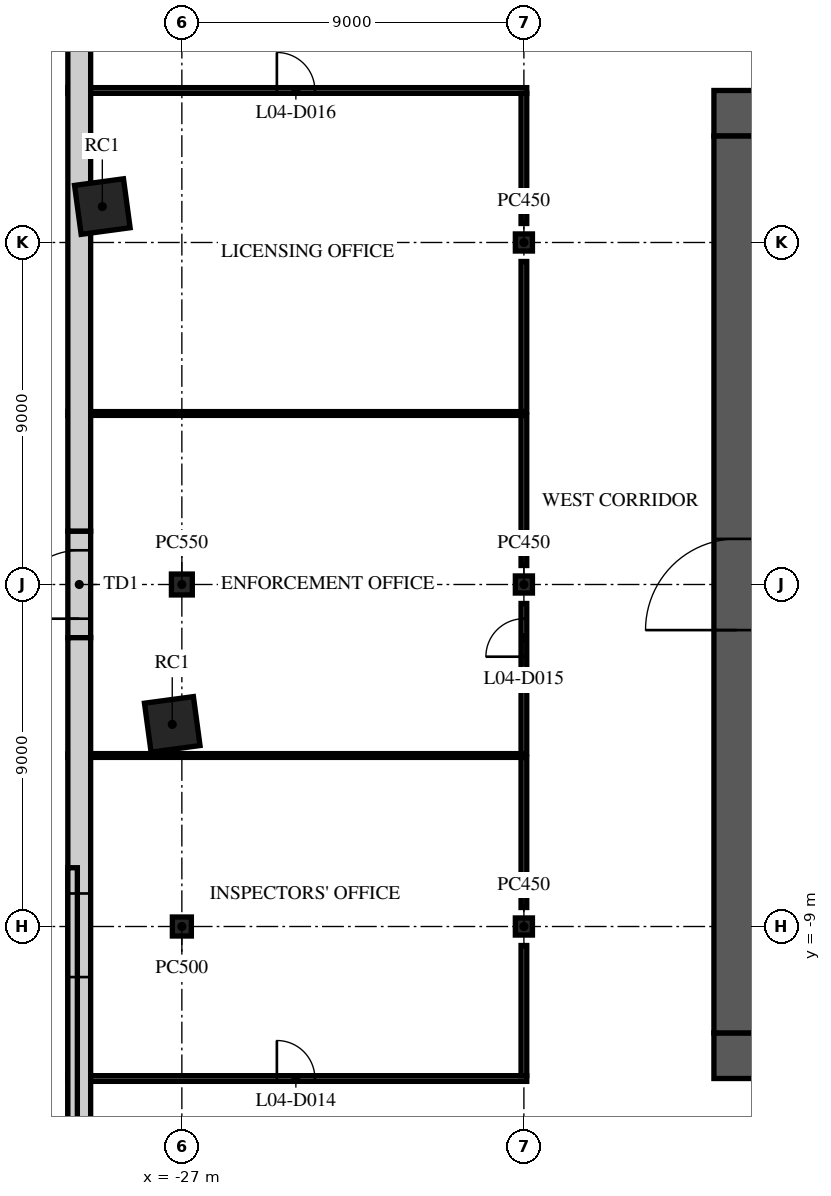
"""IFC4 building model, lengths in metres.
Left out: names, types, materials, properties, quantities, classifications, styles, units other than length and angle.
Written with IfcOpenShell. Run it as: python <this file> out.ifc"""

import sys

from ifc_helpers import new_model, si_unit, direction, frame, frame_2d, origin, origin_2d, place, context, subcontext, project, spatial, rectangle, extrude, element, fill, save


model = new_model("IFC4")
c1 = context("Model", 3, precision=1e-05, world=origin(), true_north=direction((0.0, 1.0)))
c2 = subcontext(c1, "Body", "Model", "MODEL_VIEW")
j1 = project(units=[si_unit("LENGTHUNIT", "METRE"), si_unit("PLANEANGLEUNIT", "RADIAN")], contexts=[c1])
p1 = place(None, origin())
s1 = spatial("IfcSite", under=j1, at=p1, CompositionType="ELEMENT")
p2 = place(p1, origin())
s2 = spatial("IfcBuilding", under=s1, at=p2, CompositionType="ELEMENT")
p3 = place(p2, frame((0.0, 0.0, 18.0)))
s3 = spatial("IfcBuildingStorey", under=s2, at=p3, CompositionType="ELEMENT", Elevation=18.0)
p4 = place(p3, frame((-27.0, -9.0, 0.0), z_axis=(0.0, 0.0, 1.0), x_axis=(1.0, 0.0, 0.0)))
e1 = element("IfcColumn", 1, at=p4, inside=s3, PredefinedType="COLUMN", context=c2, shape_type="SweptSolid", body=[
    extrude(rectangle(XDim=0.5, YDim=0.5, at=origin_2d()), origin(), (0.0, 0.0, 1.0), 4.5),
])
p5 = place(p3, frame((-27.0, 0.0, 0.0), z_axis=(0.0, 0.0, 1.0), x_axis=(1.0, 0.0, 0.0)))
e2 = element("IfcColumn", 2, at=p5, inside=s3, PredefinedType="COLUMN", context=c2, shape_type="SweptSolid", body=[
    extrude(rectangle(XDim=0.55, YDim=0.55, at=origin_2d()), origin(), (0.0, 0.0, 1.0), 4.5),
])
for number, where, z_axis, x_axis in (
    (3, (-18.0, -9.0, 0.0), (0.0, 0.0, 1.0), (1.0, 0.0, 0.0)),
    (4, (-18.0, 0.0, 0.0), (0.0, 0.0, 1.0), (1.0, 0.0, 0.0)),
    (5, (-18.0, 9.0, 0.0), (0.0, 0.0, 1.0), (1.0, 0.0, 0.0)),
):
    element("IfcColumn", number, at=place(p3, frame(where, z_axis=z_axis, x_axis=x_axis)), inside=s3, PredefinedType="COLUMN", context=c2, shape_type="SweptSolid", body=[
        extrude(rectangle(XDim=0.45, YDim=0.45, at=origin_2d()), origin(), (0.0, 0.0, 1.0), 4.5),
    ])
for number, where, z_axis, x_axis in (
    (6, (-29.093, 9.945, 0.0), (0.0, 0.0, 1.0), (0.991, 0.134, 0.0)),
    (7, (-27.253, -3.681, 0.0), (0.0, 0.0, 1.0), (0.991, 0.134, 0.0)),
):
    element("IfcColumn", number, at=place(p3, frame(where, z_axis=z_axis, x_axis=x_axis)), inside=s3, PredefinedType="COLUMN", context=c2, shape_type="SweptSolid", body=[
        extrude(rectangle(XDim=1.3, YDim=1.3, at=origin_2d()), origin(), (0.0, 0.0, 1.0), 4.5),
    ])
p6 = place(p3, frame((-13.0, 12.4, 0.0), z_axis=(0.0, 0.0, 1.0), x_axis=(1.0, 0.0, 0.0)))
e8 = element("IfcWall", 8, at=p6, inside=s3, PredefinedType="SHEAR", context=c2, shape_type="SweptSolid", body=[
    extrude(rectangle(XDim=26.0, YDim=1.2, at=frame_2d((13.0, 0.0))), origin(), (0.0, 0.0, 1.0), 4.05),
])
p7 = place(p6, frame((11.8, 0.0, 0.0)))
e9 = element("IfcOpeningElement", 9, at=p7, cuts=e8, PredefinedType="OPENING", context=c2, shape_type="SweptSolid", body=[
    extrude(rectangle(XDim=2.4, YDim=2.4, at=frame_2d((1.2, 1.2))), frame((0.0, 0.61, 0.0), z_axis=(0.0, -1.0, 0.0), x_axis=(1.0, 0.0, 0.0)), (0.0, 0.0, 1.0), 1.22),
])
p8 = place(p6, frame((22.625, 0.0, 0.0)))
e10 = element("IfcOpeningElement", 10, at=p8, cuts=e8, PredefinedType="OPENING", context=c2, shape_type="SweptSolid", body=[
    extrude(rectangle(XDim=1.2, YDim=2.1, at=frame_2d((0.6, 1.05))), frame((0.0, 0.61, 0.0), z_axis=(0.0, -1.0, 0.0), x_axis=(1.0, 0.0, 0.0)), (0.0, 0.0, 1.0), 1.22),
])
p9 = place(p6, frame((1.6, 0.0, 0.0)))
e11 = element("IfcOpeningElement", 11, at=p9, cuts=e8, PredefinedType="OPENING", context=c2, shape_type="SweptSolid", body=[
    extrude(rectangle(XDim=1.0, YDim=2.1, at=frame_2d((0.5, 1.05))), frame((0.0, 0.61, 0.0), z_axis=(0.0, -1.0, 0.0), x_axis=(1.0, 0.0, 0.0)), (0.0, 0.0, 1.0), 1.22),
])
p10 = place(p3, frame((-13.0, -12.4, 0.0), z_axis=(0.0, 0.0, 1.0), x_axis=(1.0, 0.0, 0.0)))
e12 = element("IfcWall", 12, at=p10, inside=s3, PredefinedType="SHEAR", context=c2, shape_type="SweptSolid", body=[
    extrude(rectangle(XDim=26.0, YDim=1.2, at=frame_2d((13.0, 0.0))), origin(), (0.0, 0.0, 1.0), 4.05),
])
p11 = place(p10, frame((7.9, 0.0, 0.0)))
e13 = element("IfcOpeningElement", 13, at=p11, cuts=e12, PredefinedType="OPENING", context=c2, shape_type="SweptSolid", body=[
    extrude(rectangle(XDim=2.0, YDim=2.1, at=frame_2d((1.0, 1.05))), frame((0.0, 0.61, 0.0), z_axis=(0.0, -1.0, 0.0), x_axis=(1.0, 0.0, 0.0)), (0.0, 0.0, 1.0), 1.22),
])
p12 = place(p10, frame((18.025, 0.0, 0.0)))
e14 = element("IfcOpeningElement", 14, at=p12, cuts=e12, PredefinedType="OPENING", context=c2, shape_type="SweptSolid", body=[
    extrude(rectangle(XDim=1.2, YDim=2.1, at=frame_2d((0.6, 1.05))), frame((0.0, 0.61, 0.0), z_axis=(0.0, -1.0, 0.0), x_axis=(1.0, 0.0, 0.0)), (0.0, 0.0, 1.0), 1.22),
])
p13 = place(p10, frame((2.175, 0.0, 0.0)))
e15 = element("IfcOpeningElement", 15, at=p13, cuts=e12, PredefinedType="OPENING", context=c2, shape_type="SweptSolid", body=[
    extrude(rectangle(XDim=1.2, YDim=2.1, at=frame_2d((0.6, 1.05))), frame((0.0, 0.61, 0.0), z_axis=(0.0, -1.0, 0.0), x_axis=(1.0, 0.0, 0.0)), (0.0, 0.0, 1.0), 1.22),
])
p14 = place(p10, frame((22.625, 0.0, 0.0)))
e16 = element("IfcOpeningElement", 16, at=p14, cuts=e12, PredefinedType="OPENING", context=c2, shape_type="SweptSolid", body=[
    extrude(rectangle(XDim=1.2, YDim=2.1, at=frame_2d((0.6, 1.05))), frame((0.0, 0.61, 0.0), z_axis=(0.0, -1.0, 0.0), x_axis=(1.0, 0.0, 0.0)), (0.0, 0.0, 1.0), 1.22),
])
p15 = place(p3, frame((-12.4, -11.8, 0.0), z_axis=(0.0, 0.0, 1.0), x_axis=(0.0, 1.0, 0.0)))
e17 = element("IfcWall", 17, at=p15, inside=s3, PredefinedType="SHEAR", context=c2, shape_type="SweptSolid", body=[
    extrude(rectangle(XDim=23.6, YDim=1.2, at=frame_2d((11.8, 0.0))), origin(), (0.0, 0.0, 1.0), 4.05),
])
p16 = place(p15, frame((10.6, 0.0, 0.0)))
e18 = element("IfcOpeningElement", 18, at=p16, cuts=e17, PredefinedType="OPENING", context=c2, shape_type="SweptSolid", body=[
    extrude(rectangle(XDim=2.4, YDim=2.4, at=frame_2d((1.2, 1.2))), frame((0.0, 0.61, 0.0), z_axis=(0.0, -1.0, 0.0), x_axis=(1.0, 0.0, 0.0)), (0.0, 0.0, 1.0), 1.22),
])
p17 = place(p3, frame((-30.0, -13.0, 0.0), z_axis=(0.0, 0.0, 1.0), x_axis=(1.0, 0.0, 0.0)))
e19 = element("IfcWall", 19, at=p17, inside=s3, PredefinedType="PARTITIONING", context=c2, shape_type="SweptSolid", body=[
    extrude(rectangle(XDim=12.075, YDim=0.15, at=frame_2d((6.038, 0.0))), origin(), (0.0, 0.0, 1.0), 3.23),
])
p18 = place(p17, frame((5.5, 0.0, 0.0)))
e20 = element("IfcOpeningElement", 20, at=p18, cuts=e19, PredefinedType="OPENING", context=c2, shape_type="SweptSolid", body=[
    extrude(rectangle(XDim=1.0, YDim=2.1, at=frame_2d((0.5, 1.05))), frame((0.0, 0.085, 0.0), z_axis=(0.0, -1.0, 0.0), x_axis=(1.0, 0.0, 0.0)), (0.0, 0.0, 1.0), 0.17),
])
for number, where, z_axis, x_axis in (
    (21, (-30.0, -4.5, 0.0), (0.0, 0.0, 1.0), (1.0, 0.0, 0.0)),
    (22, (-30.0, 4.5, 0.0), (0.0, 0.0, 1.0), (1.0, 0.0, 0.0)),
):
    element("IfcWall", number, at=place(p3, frame(where, z_axis=z_axis, x_axis=x_axis)), inside=s3, PredefinedType="PARTITIONING", context=c2, shape_type="SweptSolid", body=[
        extrude(rectangle(XDim=11.925, YDim=0.1, at=frame_2d((5.962, 0.0))), origin(), (0.0, 0.0, 1.0), 3.23),
    ])
p19 = place(p3, frame((-30.0, 13.0, 0.0), z_axis=(0.0, 0.0, 1.0), x_axis=(1.0, 0.0, 0.0)))
e23 = element("IfcWall", 23, at=p19, inside=s3, PredefinedType="PARTITIONING", context=c2, shape_type="SweptSolid", body=[
    extrude(rectangle(XDim=12.075, YDim=0.15, at=frame_2d((6.038, 0.0))), origin(), (0.0, 0.0, 1.0), 3.23),
])
p20 = place(p19, frame((5.5, 0.0, 0.0)))
e24 = element("IfcOpeningElement", 24, at=p20, cuts=e23, PredefinedType="OPENING", context=c2, shape_type="SweptSolid", body=[
    extrude(rectangle(XDim=1.0, YDim=2.1, at=frame_2d((0.5, 1.05))), frame((0.0, 0.085, 0.0), z_axis=(0.0, -1.0, 0.0), x_axis=(1.0, 0.0, 0.0)), (0.0, 0.0, 1.0), 0.17),
])
p21 = place(p3, frame((-18.0, -12.925, 0.0), z_axis=(0.0, 0.0, 1.0), x_axis=(0.0, 1.0, 0.0)))
e25 = element("IfcWall", 25, at=p21, inside=s3, PredefinedType="PARTITIONING", context=c2, shape_type="SweptSolid", body=[
    extrude(rectangle(XDim=3.425, YDim=0.15, at=frame_2d((1.712, 0.0))), origin(), (0.0, 0.0, 1.0), 3.53),
])
p22 = place(p3, frame((-18.0, -8.5, 0.0), z_axis=(0.0, 0.0, 1.0), x_axis=(0.0, 1.0, 0.0)))
e26 = element("IfcWall", 26, at=p22, inside=s3, PredefinedType="PARTITIONING", context=c2, shape_type="SweptSolid", body=[
    extrude(rectangle(XDim=3.95, YDim=0.15, at=frame_2d((1.975, 0.0))), origin(), (0.0, 0.0, 1.0), 4.05),
])
p23 = place(p3, frame((-18.0, -4.45, 0.0), z_axis=(0.0, 0.0, 1.0), x_axis=(0.0, 1.0, 0.0)))
e27 = element("IfcWall", 27, at=p23, inside=s3, PredefinedType="PARTITIONING", context=c2, shape_type="SweptSolid", body=[
    extrude(rectangle(XDim=3.95, YDim=0.15, at=frame_2d((1.975, 0.0))), origin(), (0.0, 0.0, 1.0), 3.53),
])
p24 = place(p23, frame((2.55, 0.0, 0.0)))
e28 = element("IfcOpeningElement", 28, at=p24, cuts=e27, PredefinedType="OPENING", context=c2, shape_type="SweptSolid", body=[
    extrude(rectangle(XDim=1.0, YDim=2.1, at=frame_2d((0.5, 1.05))), frame((0.0, 0.085, 0.0), z_axis=(0.0, -1.0, 0.0), x_axis=(1.0, 0.0, 0.0)), (0.0, 0.0, 1.0), 0.17),
])
p25 = place(p3, frame((-18.0, 0.5, 0.0), z_axis=(0.0, 0.0, 1.0), x_axis=(0.0, 1.0, 0.0)))
e29 = element("IfcWall", 29, at=p25, inside=s3, PredefinedType="PARTITIONING", context=c2, shape_type="SweptSolid", body=[
    extrude(rectangle(XDim=3.95, YDim=0.15, at=frame_2d((1.975, 0.0))), origin(), (0.0, 0.0, 1.0), 3.53),
])
p26 = place(p3, frame((-18.0, 4.55, 0.0), z_axis=(0.0, 0.0, 1.0), x_axis=(0.0, 1.0, 0.0)))
e30 = element("IfcWall", 30, at=p26, inside=s3, PredefinedType="PARTITIONING", context=c2, shape_type="SweptSolid", body=[
    extrude(rectangle(XDim=3.95, YDim=0.15, at=frame_2d((1.975, 0.0))), origin(), (0.0, 0.0, 1.0), 4.05),
])
p27 = place(p3, frame((-18.0, 9.5, 0.0), z_axis=(0.0, 0.0, 1.0), x_axis=(0.0, 1.0, 0.0)))
e31 = element("IfcWall", 31, at=p27, inside=s3, PredefinedType="PARTITIONING", context=c2, shape_type="SweptSolid", body=[
    extrude(rectangle(XDim=3.425, YDim=0.15, at=frame_2d((1.712, 0.0))), origin(), (0.0, 0.0, 1.0), 3.53),
])
p28 = place(p3, frame((-29.7, 29.4, 0.0), z_axis=(0.0, 0.0, 1.0), x_axis=(0.0, -1.0, 0.0)))
e32 = element("IfcWall", 32, at=p28, inside=s3, PredefinedType="STANDARD", context=c2, shape_type="SweptSolid", body=[
    extrude(rectangle(XDim=28.0, YDim=0.6, at=frame_2d((14.0, 0.0))), origin(), (0.0, 0.0, 1.0), 4.05),
])
p29 = place(p28, frame((0.908, 0.0, 0.9)))
e33 = element("IfcOpeningElement", 33, at=p29, cuts=e32, PredefinedType="OPENING", context=c2, shape_type="SweptSolid", body=[
    extrude(rectangle(XDim=2.2, YDim=3.0, at=frame_2d((1.1, 1.5))), frame((0.0, 0.31, 0.0), z_axis=(0.0, -1.0, 0.0), x_axis=(1.0, 0.0, 0.0)), (0.0, 0.0, 1.0), 0.62),
])
p30 = place(p28, frame((5.223, 0.0, 0.9)))
e34 = element("IfcOpeningElement", 34, at=p30, cuts=e32, PredefinedType="OPENING", context=c2, shape_type="SweptSolid", body=[
    extrude(rectangle(XDim=2.2, YDim=3.0, at=frame_2d((1.1, 1.5))), frame((0.0, 0.31, 0.0), z_axis=(0.0, -1.0, 0.0), x_axis=(1.0, 0.0, 0.0)), (0.0, 0.0, 1.0), 0.62),
])
p31 = place(p3, frame((-29.7, -1.4, 0.0), z_axis=(0.0, 0.0, 1.0), x_axis=(0.0, 1.0, 0.0)))
e35 = element("IfcWall", 35, at=p31, inside=s3, PredefinedType="STANDARD", context=c2, shape_type="SweptSolid", body=[
    extrude(rectangle(XDim=2.8, YDim=0.6, at=frame_2d((1.4, 0.0))), origin(), (0.0, 0.0, 1.0), 4.05),
])
p32 = place(p31, frame((0.5, 0.0, 0.0)))
e36 = element("IfcOpeningElement", 36, at=p32, cuts=e35, PredefinedType="OPENING", context=c2, shape_type="SweptSolid", body=[
    extrude(rectangle(XDim=1.8, YDim=2.4, at=frame_2d((0.9, 1.2))), frame((0.0, 0.31, 0.0), z_axis=(0.0, -1.0, 0.0), x_axis=(1.0, 0.0, 0.0)), (0.0, 0.0, 1.0), 0.62),
])
p33 = place(p3, frame((-29.7, -1.4, 0.0), z_axis=(0.0, 0.0, 1.0), x_axis=(0.0, -1.0, 0.0)))
e37 = element("IfcWall", 37, at=p33, inside=s3, PredefinedType="STANDARD", context=c2, shape_type="SweptSolid", body=[
    extrude(rectangle(XDim=28.6, YDim=0.6, at=frame_2d((14.3, 0.0))), origin(), (0.0, 0.0, 1.0), 4.05),
])
p34 = place(p33, frame((6.731, 0.0, 0.9)))
e38 = element("IfcOpeningElement", 38, at=p34, cuts=e37, PredefinedType="OPENING", context=c2, shape_type="SweptSolid", body=[
    extrude(rectangle(XDim=2.2, YDim=3.0, at=frame_2d((1.1, 1.5))), frame((0.0, 0.31, 0.0), z_axis=(0.0, -1.0, 0.0), x_axis=(1.0, 0.0, 0.0)), (0.0, 0.0, 1.0), 0.62),
])
p35 = place(p33, frame((20.577, 0.0, 0.9)))
e39 = element("IfcOpeningElement", 39, at=p35, cuts=e37, PredefinedType="OPENING", context=c2, shape_type="SweptSolid", body=[
    extrude(rectangle(XDim=2.2, YDim=3.0, at=frame_2d((1.1, 1.5))), frame((0.0, 0.31, 0.0), z_axis=(0.0, -1.0, 0.0), x_axis=(1.0, 0.0, 0.0)), (0.0, 0.0, 1.0), 0.62),
])
p36 = place(p33, frame((25.192, 0.0, 0.9)))
e40 = element("IfcOpeningElement", 40, at=p36, cuts=e37, PredefinedType="OPENING", context=c2, shape_type="SweptSolid", body=[
    extrude(rectangle(XDim=2.2, YDim=3.0, at=frame_2d((1.1, 1.5))), frame((0.0, 0.31, 0.0), z_axis=(0.0, -1.0, 0.0), x_axis=(1.0, 0.0, 0.0)), (0.0, 0.0, 1.0), 0.62),
])
p37 = place(p3, frame((-29.875, -7.453, 4.5), z_axis=(0.0, 0.0, 1.0), x_axis=(0.0, -1.0, 0.0)))
e41 = element("IfcWall", 41, at=p37, inside=s3, PredefinedType="PARAPET", context=c2, shape_type="SweptSolid", body=[
    extrude(rectangle(XDim=22.547, YDim=0.25, at=frame_2d((11.273, 0.0))), origin(), (0.0, 0.0, 1.0), 1.1),
])
p38 = place(p16, origin())
e42 = element("IfcDoor", 42, at=p38, inside=s3, OperationType="SINGLE_SWING_LEFT", PredefinedType="DOOR", context=c2, shape_type="SweptSolid", body=[
    extrude(rectangle(XDim=2.4, YDim=2.4, at=frame_2d((1.2, 1.2))), frame((0.0, 0.025, 0.0), z_axis=(0.0, -1.0, 0.0), x_axis=(1.0, 0.0, 0.0)), (0.0, 0.0, 1.0), 0.05),
])
fill(e18, e42)
p39 = place(p18, origin())
e43 = element("IfcDoor", 43, at=p39, inside=s3, OperationType="SINGLE_SWING_RIGHT", PredefinedType="DOOR", context=c2, shape_type="SweptSolid", body=[
    extrude(rectangle(XDim=1.0, YDim=2.1, at=frame_2d((0.5, 1.05))), frame((0.0, 0.025, 0.0), z_axis=(0.0, -1.0, 0.0), x_axis=(1.0, 0.0, 0.0)), (0.0, 0.0, 1.0), 0.05),
])
fill(e20, e43)
p40 = place(p24, origin())
e44 = element("IfcDoor", 44, at=p40, inside=s3, OperationType="SINGLE_SWING_LEFT", PredefinedType="DOOR", context=c2, shape_type="SweptSolid", body=[
    extrude(rectangle(XDim=1.0, YDim=2.1, at=frame_2d((0.5, 1.05))), frame((0.0, 0.025, 0.0), z_axis=(0.0, -1.0, 0.0), x_axis=(1.0, 0.0, 0.0)), (0.0, 0.0, 1.0), 0.05),
])
fill(e28, e44)
p41 = place(p20, origin())
e45 = element("IfcDoor", 45, at=p41, inside=s3, OperationType="SINGLE_SWING_RIGHT", PredefinedType="DOOR", context=c2, shape_type="SweptSolid", body=[
    extrude(rectangle(XDim=1.0, YDim=2.1, at=frame_2d((0.5, 1.05))), frame((0.0, 0.025, 0.0), z_axis=(0.0, -1.0, 0.0), x_axis=(1.0, 0.0, 0.0)), (0.0, 0.0, 1.0), 0.05),
])
fill(e24, e45)
p42 = place(p32, origin())
e46 = element("IfcDoor", 46, at=p42, inside=s3, OperationType="DOUBLE_DOOR_SINGLE_SWING", PredefinedType="DOOR", context=c2, shape_type="SweptSolid", body=[
    extrude(rectangle(XDim=1.8, YDim=2.4, at=frame_2d((0.9, 1.2))), frame((0.0, 0.025, 0.0), z_axis=(0.0, -1.0, 0.0), x_axis=(1.0, 0.0, 0.0)), (0.0, 0.0, 1.0), 0.05),
])
fill(e36, e46)
p43 = place(p34, origin())
e47 = element("IfcWindow", 47, at=p43, inside=s3, PartitioningType="SINGLE_PANEL", PredefinedType="WINDOW", context=c2, shape_type="SweptSolid", body=[
    extrude(rectangle(XDim=2.2, YDim=3.0, at=frame_2d((1.1, 1.5))), frame((0.0, 0.03, 0.0), z_axis=(0.0, -1.0, 0.0), x_axis=(1.0, 0.0, 0.0)), (0.0, 0.0, 1.0), 0.06),
])
fill(e38, e47)
save(model, sys.argv[1])
